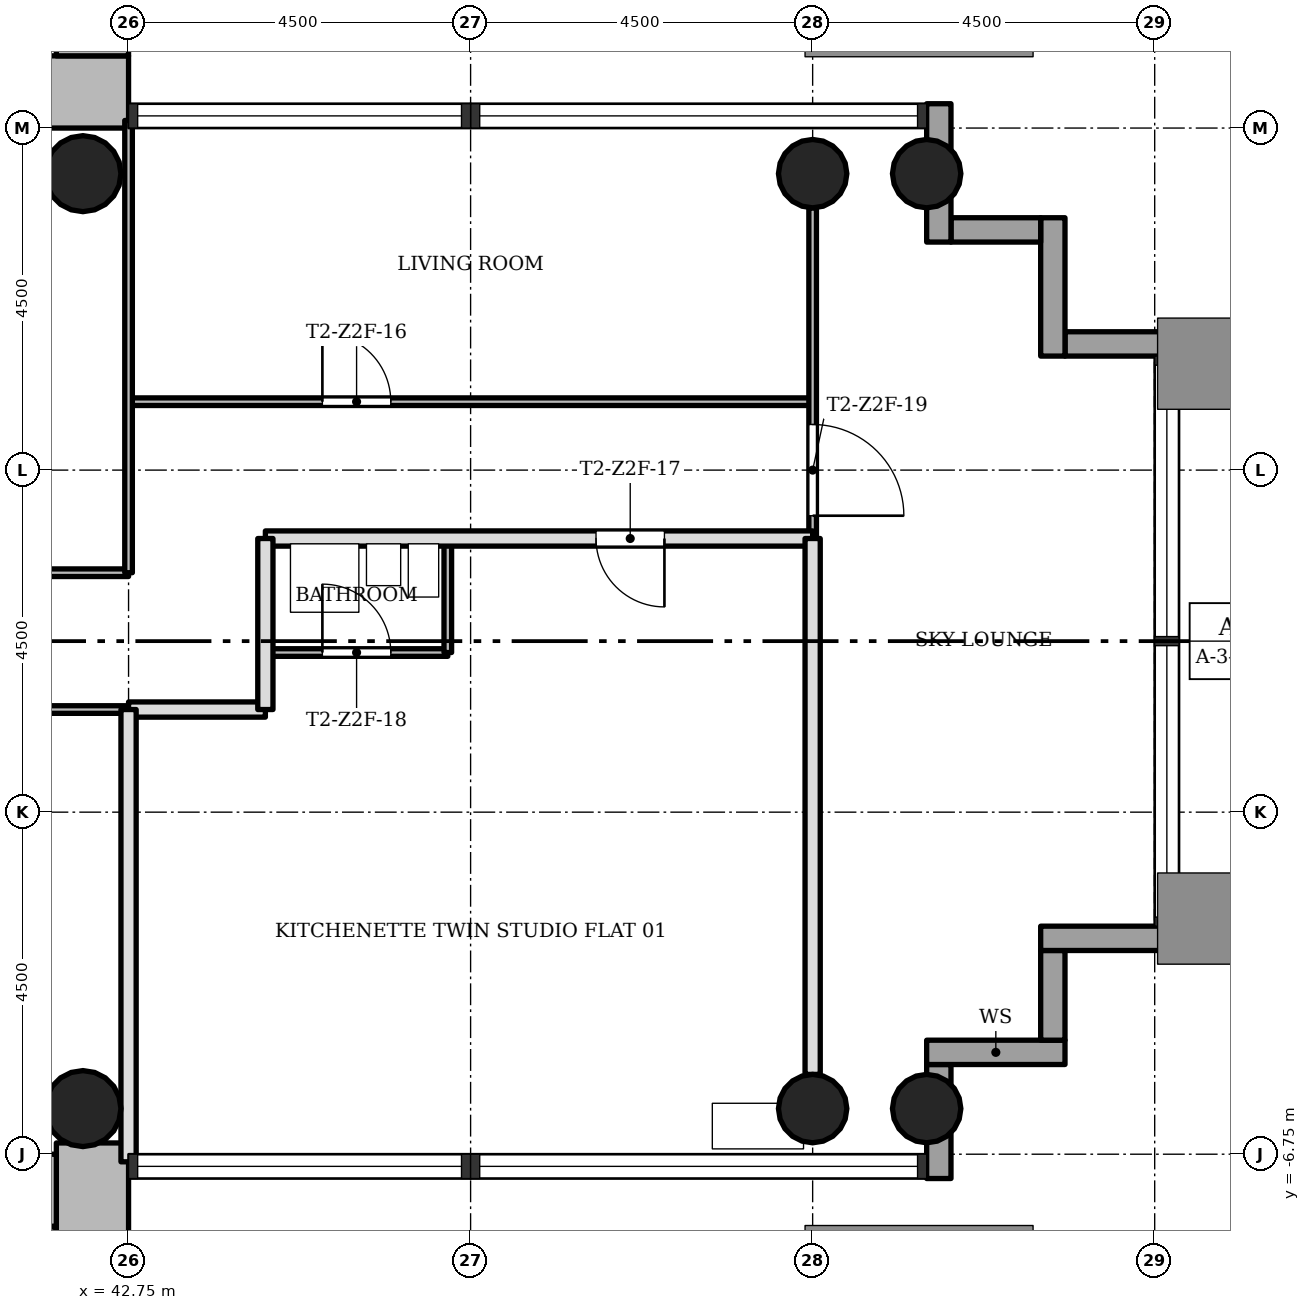
"""IFC4 building model, lengths in metres.
Left out: names, types, materials, properties, quantities, classifications, styles, units other than length and angle.
Written with IfcOpenShell. Run it as: python <this file> out.ifc"""

import sys

from ifc_helpers import new_model, si_unit, direction, frame, frame_2d, origin, origin_2d, place, context, subcontext, project, spatial, rectangle, hollow_circle, extrude, element, fill, save


model = new_model("IFC4")
c1 = context("Model", 3, precision=1e-05, world=origin(), true_north=direction((0.0, 1.0)))
c2 = subcontext(c1, "Body", "Model", "MODEL_VIEW")
j1 = project(units=[si_unit("LENGTHUNIT", "METRE"), si_unit("PLANEANGLEUNIT", "RADIAN")], contexts=[c1])
p1 = place(None, origin())
s1 = spatial("IfcSite", under=j1, at=p1, CompositionType="ELEMENT")
p2 = place(p1, origin())
s2 = spatial("IfcBuilding", under=s1, at=p2, CompositionType="ELEMENT")
p3 = place(p2, frame((0.0, 0.0, 114.0)))
s3 = spatial("IfcBuildingStorey", under=s2, at=p3, CompositionType="ELEMENT", Elevation=114.0)
p4 = place(p3, frame((30.2, 7.225, 0.0), z_axis=(0.0, 0.0, 1.0), x_axis=(1.0, 0.0, 0.0)))
e1 = element("IfcWall", 1, at=p4, inside=s3, PredefinedType="SHEAR", context=c2, shape_type="SweptSolid", body=[
    extrude(rectangle(XDim=12.55, YDim=0.95, at=frame_2d((6.275, 0.0))), origin(), (0.0, 0.0, 1.0), 3.4),
])
p5 = place(p4, frame((4.9, 0.0, 0.0)))
e2 = element("IfcOpeningElement", 2, at=p5, cuts=e1, PredefinedType="OPENING", context=c2, shape_type="SweptSolid", body=[
    extrude(rectangle(XDim=1.8, YDim=2.1, at=frame_2d((0.9, 1.05))), frame((0.0, 0.485, 0.0), z_axis=(0.0, -1.0, 0.0), x_axis=(1.0, 0.0, 0.0)), (0.0, 0.0, 1.0), 0.97),
])
p6 = place(p3, frame((42.275, 7.7, 0.0), z_axis=(0.0, 0.0, 1.0), x_axis=(0.0, 1.0, 0.0)))
e3 = element("IfcWall", 3, at=p6, inside=s3, PredefinedType="SHEAR", context=c2, shape_type="SweptSolid", body=[
    extrude(rectangle(XDim=8.05, YDim=0.95, at=frame_2d((4.025, 0.0))), origin(), (0.0, 0.0, 1.0), 3.4),
])
p7 = place(p3, frame((42.275, -14.8, 0.0), z_axis=(0.0, 0.0, 1.0), x_axis=(0.0, 1.0, 0.0)))
e4 = element("IfcWall", 4, at=p7, inside=s3, PredefinedType="SHEAR", context=c2, shape_type="SweptSolid", body=[
    extrude(rectangle(XDim=8.198, YDim=0.95, at=frame_2d((4.099, 0.0))), origin(), (0.0, 0.0, 1.0), 3.4),
])
p8 = place(p3, frame((41.8, -7.225, 0.0), z_axis=(0.0, 0.0, 1.0), x_axis=(-1.0, 0.0, 0.0)))
e5 = element("IfcWall", 5, at=p8, inside=s3, PredefinedType="SHEAR", context=c2, shape_type="SweptSolid", body=[
    extrude(rectangle(XDim=12.55, YDim=0.95, at=frame_2d((6.275, 0.0))), origin(), (0.0, 0.0, 1.0), 3.4),
])
p9 = place(p8, frame((4.9, 0.0, 0.0)))
e6 = element("IfcOpeningElement", 6, at=p9, cuts=e5, PredefinedType="OPENING", context=c2, shape_type="SweptSolid", body=[
    extrude(rectangle(XDim=1.8, YDim=2.1, at=frame_2d((0.9, 1.05))), frame((0.0, 0.485, 0.0), z_axis=(0.0, -1.0, 0.0), x_axis=(1.0, 0.0, 0.0)), (0.0, 0.0, 1.0), 0.97),
])
for number, where, z_axis, x_axis in (
    (7, (51.75, -6.15, 0.0), (0.0, 0.0, 1.0), (1.0, 0.0, 0.0)),
    (8, (51.75, 6.15, 0.0), (0.0, 0.0, 1.0), (1.0, 0.0, 0.0)),
    (9, (53.25, -6.15, 0.0), (0.0, 0.0, 1.0), (1.0, 0.0, 0.0)),
    (10, (53.25, 6.15, 0.0), (0.0, 0.0, 1.0), (1.0, 0.0, 0.0)),
):
    element("IfcColumn", number, at=place(p3, frame(where, z_axis=z_axis, x_axis=x_axis)), inside=s3, PredefinedType="COLUMN", context=c2, shape_type="SweptSolid", body=[
        extrude(hollow_circle(Radius=0.45, WallThickness=0.032, at=origin_2d()), origin(), (0.0, 0.0, 1.0), 3.4),
    ])
for number, where, z_axis, x_axis in (
    (11, (42.15, -6.15, 0.0), (0.0, 0.0, 1.0), (1.0, 0.0, 0.0)),
    (12, (42.15, 6.15, 0.0), (0.0, 0.0, 1.0), (1.0, 0.0, 0.0)),
):
    element("IfcColumn", number, at=place(p3, frame(where, z_axis=z_axis, x_axis=x_axis)), inside=s3, PredefinedType="COLUMN", context=c2, shape_type="SweptSolid", body=[
        extrude(hollow_circle(Radius=0.5, WallThickness=0.036, at=origin_2d()), origin(), (0.0, 0.0, 1.0), 3.4),
    ])
p10 = place(p3, frame((53.41, -7.07, -0.3), z_axis=(0.0, 0.0, 1.0), x_axis=(0.0, 1.0, 0.0)))
e13 = element("IfcWall", 13, at=p10, inside=s3, PredefinedType="STANDARD", context=c2, shape_type="SweptSolid", body=[
    extrude(rectangle(XDim=1.5, YDim=0.32, at=frame_2d((0.75, 0.0))), origin(), (0.0, 0.0, 1.0), 3.4),
])
p11 = place(p3, frame((53.25, -5.41, -0.3), z_axis=(0.0, 0.0, 1.0), x_axis=(1.0, 0.0, 0.0)))
e14 = element("IfcWall", 14, at=p11, inside=s3, PredefinedType="STANDARD", context=c2, shape_type="SweptSolid", body=[
    extrude(rectangle(XDim=1.82, YDim=0.32, at=frame_2d((0.91, 0.0))), origin(), (0.0, 0.0, 1.0), 3.4),
])
p12 = place(p3, frame((54.91, -5.25, -0.3), z_axis=(0.0, 0.0, 1.0), x_axis=(0.0, 1.0, 0.0)))
e15 = element("IfcWall", 15, at=p12, inside=s3, PredefinedType="STANDARD", context=c2, shape_type="SweptSolid", body=[
    extrude(rectangle(XDim=1.18, YDim=0.32, at=frame_2d((0.59, 0.0))), origin(), (0.0, 0.0, 1.0), 3.4),
])
p13 = place(p3, frame((54.75, -3.91, -0.3), z_axis=(0.0, 0.0, 1.0), x_axis=(1.0, 0.0, 0.0)))
e16 = element("IfcWall", 16, at=p13, inside=s3, PredefinedType="STANDARD", context=c2, shape_type="SweptSolid", body=[
    extrude(rectangle(XDim=1.82, YDim=0.32, at=frame_2d((0.91, 0.0))), origin(), (0.0, 0.0, 1.0), 3.4),
])
p14 = place(p3, frame((56.57, 3.91, -0.3), z_axis=(0.0, 0.0, 1.0), x_axis=(-1.0, 0.0, 0.0)))
e17 = element("IfcWall", 17, at=p14, inside=s3, PredefinedType="STANDARD", context=c2, shape_type="SweptSolid", body=[
    extrude(rectangle(XDim=1.5, YDim=0.32, at=frame_2d((0.75, 0.0))), origin(), (0.0, 0.0, 1.0), 3.4),
])
p15 = place(p3, frame((54.91, 3.75, -0.3), z_axis=(0.0, 0.0, 1.0), x_axis=(0.0, 1.0, 0.0)))
e18 = element("IfcWall", 18, at=p15, inside=s3, PredefinedType="STANDARD", context=c2, shape_type="SweptSolid", body=[
    extrude(rectangle(XDim=1.82, YDim=0.32, at=frame_2d((0.91, 0.0))), origin(), (0.0, 0.0, 1.0), 3.4),
])
p16 = place(p3, frame((54.75, 5.41, -0.3), z_axis=(0.0, 0.0, 1.0), x_axis=(-1.0, 0.0, 0.0)))
e19 = element("IfcWall", 19, at=p16, inside=s3, PredefinedType="STANDARD", context=c2, shape_type="SweptSolid", body=[
    extrude(rectangle(XDim=1.18, YDim=0.32, at=frame_2d((0.59, 0.0))), origin(), (0.0, 0.0, 1.0), 3.4),
])
p17 = place(p3, frame((53.41, 5.25, -0.3), z_axis=(0.0, 0.0, 1.0), x_axis=(0.0, 1.0, 0.0)))
e20 = element("IfcWall", 20, at=p17, inside=s3, PredefinedType="STANDARD", context=c2, shape_type="SweptSolid", body=[
    extrude(rectangle(XDim=1.82, YDim=0.32, at=frame_2d((0.91, 0.0))), origin(), (0.0, 0.0, 1.0), 3.4),
])
p18 = place(p3, frame((42.75, -0.9, 0.0), z_axis=(0.0, 0.0, 1.0), x_axis=(-1.0, 0.0, 0.0)))
e21 = element("IfcWall", 21, at=p18, inside=s3, PredefinedType="PARTITIONING", context=c2, shape_type="SweptSolid", body=[
    extrude(rectangle(XDim=5.25, YDim=0.1, at=frame_2d((2.625, 0.0))), origin(), (0.0, 0.0, 1.0), 3.0),
])
p19 = place(p3, frame((44.55, -0.9, 0.0), z_axis=(0.0, 0.0, 1.0), x_axis=(-1.0, 0.0, 0.0)))
e22 = element("IfcWall", 22, at=p19, inside=s3, PredefinedType="SOLIDWALL", context=c2, shape_type="SweptSolid", body=[
    extrude(rectangle(XDim=1.8, YDim=0.2, at=frame_2d((0.9, 0.0))), origin(), (0.0, 0.0, 1.0), 3.0),
])
p20 = place(p3, frame((46.95, -0.15, 0.0), z_axis=(0.0, 0.0, 1.0), x_axis=(-1.0, 0.0, 0.0)))
e23 = element("IfcWall", 23, at=p20, inside=s3, PredefinedType="PARTITIONING", context=c2, shape_type="SweptSolid", body=[
    extrude(rectangle(XDim=2.4, YDim=0.1, at=frame_2d((1.2, 0.0))), origin(), (0.0, 0.0, 1.0), 3.0),
])
p21 = place(p20, frame((0.75, 0.0, 0.0)))
e24 = element("IfcOpeningElement", 24, at=p21, cuts=e23, PredefinedType="OPENING", context=c2, shape_type="SweptSolid", body=[
    extrude(rectangle(XDim=0.9, YDim=2.1, at=frame_2d((0.45, 1.05))), frame((0.0, 0.06, 0.0), z_axis=(0.0, -1.0, 0.0), x_axis=(1.0, 0.0, 0.0)), (0.0, 0.0, 1.0), 0.12),
])
p22 = place(p3, frame((42.75, 0.9, 0.0), z_axis=(0.0, 0.0, 1.0), x_axis=(-1.0, 0.0, 0.0)))
e25 = element("IfcWall", 25, at=p22, inside=s3, PredefinedType="PARTITIONING", context=c2, shape_type="SweptSolid", body=[
    extrude(rectangle(XDim=5.25, YDim=0.1, at=frame_2d((2.625, 0.0))), origin(), (0.0, 0.0, 1.0), 3.0),
])
p23 = place(p3, frame((51.75, 1.35, 0.0), z_axis=(0.0, 0.0, 1.0), x_axis=(-1.0, 0.0, 0.0)))
e26 = element("IfcWall", 26, at=p23, inside=s3, PredefinedType="SOLIDWALL", context=c2, shape_type="SweptSolid", body=[
    extrude(rectangle(XDim=7.2, YDim=0.2, at=frame_2d((3.6, 0.0))), origin(), (0.0, 0.0, 1.0), 3.0),
])
p24 = place(p23, frame((1.95, 0.0, 0.0)))
e27 = element("IfcOpeningElement", 27, at=p24, cuts=e26, PredefinedType="OPENING", context=c2, shape_type="SweptSolid", body=[
    extrude(rectangle(XDim=0.9, YDim=2.1, at=frame_2d((0.45, 1.05))), frame((0.0, 0.11, 0.0), z_axis=(0.0, -1.0, 0.0), x_axis=(1.0, 0.0, 0.0)), (0.0, 0.0, 1.0), 0.22),
])
p25 = place(p3, frame((51.75, 3.15, 0.0), z_axis=(0.0, 0.0, 1.0), x_axis=(-1.0, 0.0, 0.0)))
e28 = element("IfcWall", 28, at=p25, inside=s3, PredefinedType="PARTITIONING", context=c2, shape_type="SweptSolid", body=[
    extrude(rectangle(XDim=9.0, YDim=0.1, at=frame_2d((4.5, 0.0))), origin(), (0.0, 0.0, 1.0), 3.0),
])
p26 = place(p25, frame((5.55, 0.0, 0.0)))
e29 = element("IfcOpeningElement", 29, at=p26, cuts=e28, PredefinedType="OPENING", context=c2, shape_type="SweptSolid", body=[
    extrude(rectangle(XDim=0.9, YDim=2.1, at=frame_2d((0.45, 1.05))), frame((0.0, 0.06, 0.0), z_axis=(0.0, -1.0, 0.0), x_axis=(1.0, 0.0, 0.0)), (0.0, 0.0, 1.0), 0.12),
])
p27 = place(p3, frame((51.75, 1.35, 0.0), z_axis=(0.0, 0.0, 1.0), x_axis=(0.0, 1.0, 0.0)))
e30 = element("IfcWall", 30, at=p27, inside=s3, PredefinedType="PARTITIONING", context=c2, shape_type="SweptSolid", body=[
    extrude(rectangle(XDim=4.35, YDim=0.1, at=frame_2d((2.175, 0.0))), origin(), (0.0, 0.0, 1.0), 3.0),
])
p28 = place(p27, frame((0.3, 0.0, 0.0)))
e31 = element("IfcOpeningElement", 31, at=p28, cuts=e30, PredefinedType="OPENING", context=c2, shape_type="SweptSolid", body=[
    extrude(rectangle(XDim=1.2, YDim=2.1, at=frame_2d((0.6, 1.05))), frame((0.0, 0.06, 0.0), z_axis=(0.0, -1.0, 0.0), x_axis=(1.0, 0.0, 0.0)), (0.0, 0.0, 1.0), 0.12),
])
p29 = place(p3, frame((51.75, -5.7, 0.0), z_axis=(0.0, 0.0, 1.0), x_axis=(0.0, 1.0, 0.0)))
e32 = element("IfcWall", 32, at=p29, inside=s3, PredefinedType="SOLIDWALL", context=c2, shape_type="SweptSolid", body=[
    extrude(rectangle(XDim=7.05, YDim=0.2, at=frame_2d((3.525, 0.0))), origin(), (0.0, 0.0, 1.0), 3.0),
])
p30 = place(p3, frame((46.95, -0.15, 0.0), z_axis=(0.0, 0.0, 1.0), x_axis=(0.0, 1.0, 0.0)))
e33 = element("IfcWall", 33, at=p30, inside=s3, PredefinedType="PARTITIONING", context=c2, shape_type="SweptSolid", body=[
    extrude(rectangle(XDim=1.5, YDim=0.1, at=frame_2d((0.75, 0.0))), origin(), (0.0, 0.0, 1.0), 3.0),
])
p31 = place(p3, frame((44.55, -0.9, 0.0), z_axis=(0.0, 0.0, 1.0), x_axis=(0.0, 1.0, 0.0)))
e34 = element("IfcWall", 34, at=p31, inside=s3, PredefinedType="SOLIDWALL", context=c2, shape_type="SweptSolid", body=[
    extrude(rectangle(XDim=2.25, YDim=0.2, at=frame_2d((1.125, 0.0))), origin(), (0.0, 0.0, 1.0), 3.0),
])
p32 = place(p3, frame((42.75, 0.9, 0.0), z_axis=(0.0, 0.0, 1.0), x_axis=(0.0, 1.0, 0.0)))
e35 = element("IfcWall", 35, at=p32, inside=s3, PredefinedType="PARTITIONING", context=c2, shape_type="SweptSolid", body=[
    extrude(rectangle(XDim=5.95, YDim=0.1, at=frame_2d((2.975, 0.0))), origin(), (0.0, 0.0, 1.0), 3.0),
])
p33 = place(p3, frame((42.75, -6.85, 0.0), z_axis=(0.0, 0.0, 1.0), x_axis=(0.0, 1.0, 0.0)))
e36 = element("IfcWall", 36, at=p33, inside=s3, PredefinedType="SOLIDWALL", context=c2, shape_type="SweptSolid", body=[
    extrude(rectangle(XDim=5.95, YDim=0.2, at=frame_2d((2.975, 0.0))), origin(), (0.0, 0.0, 1.0), 3.0),
])
p34 = place(p3, frame((37.9, -7.825, 0.0), z_axis=(0.0, 0.0, 1.0), x_axis=(1.0, 0.0, 0.0)))
e37 = element("IfcWall", 37, at=p34, inside=s3, PredefinedType="SHEAR", context=c2, shape_type="SweptSolid", body=[
    extrude(rectangle(XDim=3.9, YDim=0.25, at=frame_2d((1.95, 0.0))), origin(), (0.0, 0.0, 1.0), 3.4),
])
p35 = place(p26, origin())
e38 = element("IfcDoor", 38, at=p35, inside=s3, OperationType="SINGLE_SWING_RIGHT", PredefinedType="DOOR", context=c2, shape_type="SweptSolid", body=[
    extrude(rectangle(XDim=0.9, YDim=2.1, at=frame_2d((0.45, 1.05))), frame((0.0, 0.025, 0.0), z_axis=(0.0, -1.0, 0.0), x_axis=(1.0, 0.0, 0.0)), (0.0, 0.0, 1.0), 0.05),
])
fill(e29, e38)
p36 = place(p24, origin())
e39 = element("IfcDoor", 39, at=p36, inside=s3, OperationType="SINGLE_SWING_RIGHT", PredefinedType="DOOR", context=c2, shape_type="SweptSolid", body=[
    extrude(rectangle(XDim=0.9, YDim=2.1, at=frame_2d((0.45, 1.05))), frame((0.0, 0.025, 0.0), z_axis=(0.0, -1.0, 0.0), x_axis=(1.0, 0.0, 0.0)), (0.0, 0.0, 1.0), 0.05),
])
fill(e27, e39)
p37 = place(p21, origin())
e40 = element("IfcDoor", 40, at=p37, inside=s3, OperationType="SINGLE_SWING_RIGHT", PredefinedType="DOOR", context=c2, shape_type="SweptSolid", body=[
    extrude(rectangle(XDim=0.9, YDim=2.1, at=frame_2d((0.45, 1.05))), frame((0.0, 0.025, 0.0), z_axis=(0.0, -1.0, 0.0), x_axis=(1.0, 0.0, 0.0)), (0.0, 0.0, 1.0), 0.05),
])
fill(e24, e40)
p38 = place(p28, origin())
e41 = element("IfcDoor", 41, at=p38, inside=s3, OperationType="SINGLE_SWING_LEFT", PredefinedType="DOOR", context=c2, shape_type="SweptSolid", body=[
    extrude(rectangle(XDim=1.2, YDim=2.1, at=frame_2d((0.6, 1.05))), frame((0.0, 0.025, 0.0), z_axis=(0.0, -1.0, 0.0), x_axis=(1.0, 0.0, 0.0)), (0.0, 0.0, 1.0), 0.05),
])
fill(e31, e41)
save(model, sys.argv[1])
